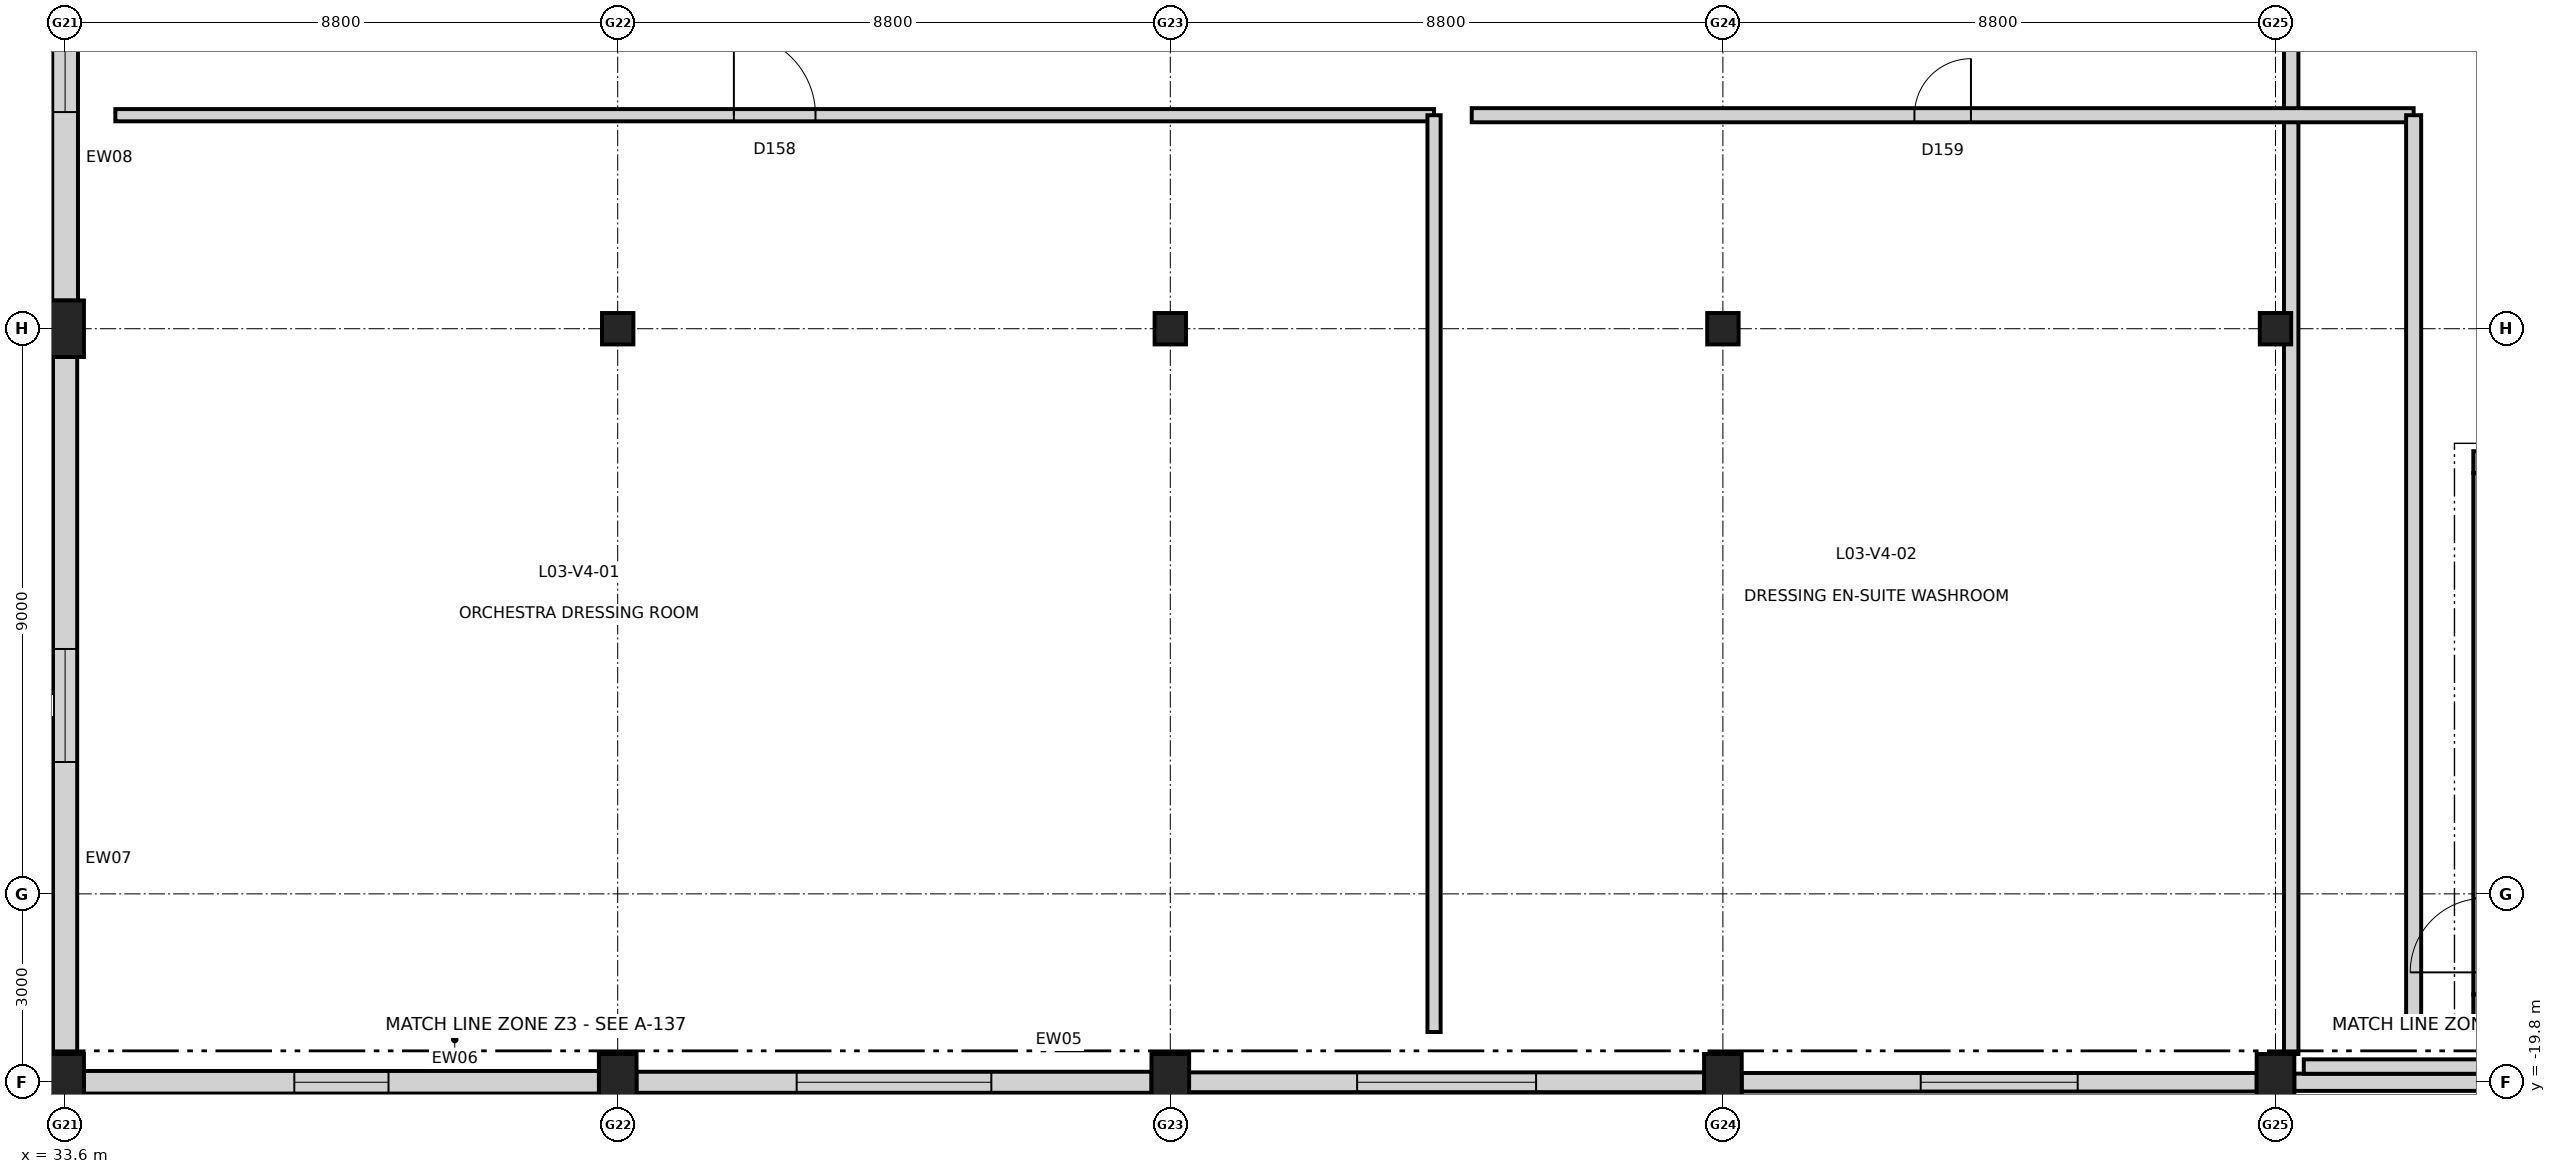
"""IFC4 building model, lengths in metres.
Left out: names, types, materials, properties, quantities, classifications, styles, units other than length and angle.
Written with IfcOpenShell. Run it as: python <this file> out.ifc"""

import sys

from ifc_helpers import new_model, si_unit, direction, frame, frame_2d, origin, origin_2d, place, context, subcontext, project, spatial, rectangle, extrude, element, fill, save


model = new_model("IFC4")
c1 = context("Model", 3, precision=1e-05, world=origin(), true_north=direction((0.0, 1.0)))
c2 = subcontext(c1, "Body", "Model", "MODEL_VIEW")
j1 = project(units=[si_unit("LENGTHUNIT", "METRE"), si_unit("PLANEANGLEUNIT", "RADIAN")], contexts=[c1])
p1 = place(None, origin())
s1 = spatial("IfcSite", under=j1, at=p1, CompositionType="ELEMENT")
p2 = place(p1, origin())
s2 = spatial("IfcBuilding", under=s1, at=p2, CompositionType="ELEMENT")
p3 = place(p2, frame((0.0, 0.0, 15.0)))
s3 = spatial("IfcBuildingStorey", under=s2, at=p3, CompositionType="ELEMENT", Elevation=15.0)
for number, where, z_axis, x_axis in (
    (1, (33.6, -19.8, 0.0), (0.0, 0.0, 1.0), (1.0, 0.0, 0.0)),
    (2, (33.6, -7.8, 0.0), (0.0, 0.0, 1.0), (1.0, 0.0, 0.0)),
    (3, (42.4, -19.8, 0.0), (0.0, 0.0, 1.0), (1.0, 0.0, 0.0)),
):
    element("IfcColumn", number, at=place(p3, frame(where, z_axis=z_axis, x_axis=x_axis)), inside=s3, PredefinedType="COLUMN", context=c2, shape_type="SweptSolid", body=[
        extrude(rectangle(XDim=0.6, YDim=0.9, at=origin_2d()), origin(), (0.0, 0.0, 1.0), 4.8),
    ])
p4 = place(p3, frame((42.4, -7.8, 0.0), z_axis=(0.0, 0.0, 1.0), x_axis=(1.0, 0.0, 0.0)))
e4 = element("IfcColumn", 4, at=p4, inside=s3, PredefinedType="COLUMN", context=c2, shape_type="SweptSolid", body=[
    extrude(rectangle(XDim=0.5, YDim=0.5, at=origin_2d()), origin(), (0.0, 0.0, 1.0), 4.8),
])
p5 = place(p3, frame((51.2, -19.8, 0.0), z_axis=(0.0, 0.0, 1.0), x_axis=(1.0, 0.0, 0.0)))
e5 = element("IfcColumn", 5, at=p5, inside=s3, PredefinedType="COLUMN", context=c2, shape_type="SweptSolid", body=[
    extrude(rectangle(XDim=0.6, YDim=0.9, at=origin_2d()), origin(), (0.0, 0.0, 1.0), 4.8),
])
p6 = place(p3, frame((51.2, -7.8, 0.0), z_axis=(0.0, 0.0, 1.0), x_axis=(1.0, 0.0, 0.0)))
e6 = element("IfcColumn", 6, at=p6, inside=s3, PredefinedType="COLUMN", context=c2, shape_type="SweptSolid", body=[
    extrude(rectangle(XDim=0.5, YDim=0.5, at=origin_2d()), origin(), (0.0, 0.0, 1.0), 4.8),
])
p7 = place(p3, frame((60.0, -19.8, 0.0), z_axis=(0.0, 0.0, 1.0), x_axis=(1.0, 0.0, 0.0)))
e7 = element("IfcColumn", 7, at=p7, inside=s3, PredefinedType="COLUMN", context=c2, shape_type="SweptSolid", body=[
    extrude(rectangle(XDim=0.6, YDim=0.9, at=origin_2d()), origin(), (0.0, 0.0, 1.0), 4.8),
])
p8 = place(p3, frame((60.0, -7.8, 0.0), z_axis=(0.0, 0.0, 1.0), x_axis=(1.0, 0.0, 0.0)))
e8 = element("IfcColumn", 8, at=p8, inside=s3, PredefinedType="COLUMN", context=c2, shape_type="SweptSolid", body=[
    extrude(rectangle(XDim=0.5, YDim=0.5, at=origin_2d()), origin(), (0.0, 0.0, 1.0), 4.8),
])
p9 = place(p3, frame((68.8, -19.8, 0.0), z_axis=(0.0, 0.0, 1.0), x_axis=(1.0, 0.0, 0.0)))
e9 = element("IfcColumn", 9, at=p9, inside=s3, PredefinedType="COLUMN", context=c2, shape_type="SweptSolid", body=[
    extrude(rectangle(XDim=0.6, YDim=0.9, at=origin_2d()), origin(), (0.0, 0.0, 1.0), 4.8),
])
p10 = place(p3, frame((68.8, -7.8, 0.0), z_axis=(0.0, 0.0, 1.0), x_axis=(1.0, 0.0, 0.0)))
e10 = element("IfcColumn", 10, at=p10, inside=s3, PredefinedType="COLUMN", context=c2, shape_type="SweptSolid", body=[
    extrude(rectangle(XDim=0.5, YDim=0.5, at=origin_2d()), origin(), (0.0, 0.0, 1.0), 4.8),
])
p11 = place(p3, frame((77.302, -19.8, 0.0), z_axis=(0.0, 0.0, 1.0), x_axis=(-1.0, 0.0, 0.0)))
e11 = element("IfcWall", 11, at=p11, inside=s3, PredefinedType="STANDARD", context=c2, shape_type="SweptSolid", body=[
    extrude(rectangle(XDim=8.204, YDim=0.275, at=frame_2d((4.102, 0.0))), origin(), (0.0, 0.0, 1.0), 3.745),
])
p12 = place(p11, frame((3.002, 0.0, 0.85)))
e12 = element("IfcOpeningElement", 12, at=p12, cuts=e11, PredefinedType="OPENING", context=c2, shape_type="SweptSolid", body=[
    extrude(rectangle(XDim=2.2, YDim=2.1, at=frame_2d((1.1, 1.05))), frame((0.0, 0.147, 0.0), z_axis=(0.0, -1.0, 0.0), x_axis=(1.0, 0.0, 0.0)), (0.0, 0.0, 1.0), 0.295),
])
p13 = place(p3, frame((68.502, -19.8, 0.0), z_axis=(0.0, 0.0, 1.0), x_axis=(-1.0, 0.0, 0.0)))
e13 = element("IfcWall", 13, at=p13, inside=s3, PredefinedType="STANDARD", context=c2, shape_type="SweptSolid", body=[
    extrude(rectangle(XDim=8.204, YDim=0.295, at=frame_2d((4.102, 0.0))), origin(), (0.0, 0.0, 1.0), 3.66),
])
p14 = place(p13, frame((2.852, 0.0, 0.85)))
e14 = element("IfcOpeningElement", 14, at=p14, cuts=e13, PredefinedType="OPENING", context=c2, shape_type="SweptSolid", body=[
    extrude(rectangle(XDim=2.5, YDim=2.1, at=frame_2d((1.25, 1.05))), frame((0.0, 0.157, 0.0), z_axis=(0.0, -1.0, 0.0), x_axis=(1.0, 0.0, 0.0)), (0.0, 0.0, 1.0), 0.315),
])
p15 = place(p3, frame((59.702, -19.8, 0.0), z_axis=(0.0, 0.0, 1.0), x_axis=(-1.0, 0.0, 0.0)))
e15 = element("IfcWall", 15, at=p15, inside=s3, PredefinedType="STANDARD", context=c2, shape_type="SweptSolid", body=[
    extrude(rectangle(XDim=8.204, YDim=0.315, at=frame_2d((4.102, 0.0))), origin(), (0.0, 0.0, 1.0), 3.66),
])
p16 = place(p15, frame((2.677, 0.0, 0.85)))
e16 = element("IfcOpeningElement", 16, at=p16, cuts=e15, PredefinedType="OPENING", context=c2, shape_type="SweptSolid", body=[
    extrude(rectangle(XDim=2.85, YDim=2.1, at=frame_2d((1.425, 1.05))), frame((0.0, 0.167, 0.0), z_axis=(0.0, -1.0, 0.0), x_axis=(1.0, 0.0, 0.0)), (0.0, 0.0, 1.0), 0.335),
])
p17 = place(p3, frame((50.902, -19.8, 0.0), z_axis=(0.0, 0.0, 1.0), x_axis=(-1.0, 0.0, 0.0)))
e17 = element("IfcWall", 17, at=p17, inside=s3, PredefinedType="STANDARD", context=c2, shape_type="SweptSolid", body=[
    extrude(rectangle(XDim=8.204, YDim=0.335, at=frame_2d((4.102, 0.0))), origin(), (0.0, 0.0, 1.0), 3.66),
])
p18 = place(p17, frame((2.552, 0.0, 0.85)))
e18 = element("IfcOpeningElement", 18, at=p18, cuts=e17, PredefinedType="OPENING", context=c2, shape_type="SweptSolid", body=[
    extrude(rectangle(XDim=3.1, YDim=2.1, at=frame_2d((1.55, 1.05))), frame((0.0, 0.177, 0.0), z_axis=(0.0, -1.0, 0.0), x_axis=(1.0, 0.0, 0.0)), (0.0, 0.0, 1.0), 0.355),
])
p19 = place(p3, frame((42.102, -19.8, 0.0), z_axis=(0.0, 0.0, 1.0), x_axis=(-1.0, 0.0, 0.0)))
e19 = element("IfcWall", 19, at=p19, inside=s3, PredefinedType="STANDARD", context=c2, shape_type="SweptSolid", body=[
    extrude(rectangle(XDim=8.204, YDim=0.36, at=frame_2d((4.102, 0.0))), origin(), (0.0, 0.0, 1.0), 3.66),
])
p20 = place(p19, frame((3.352, 0.0, 0.6)))
e20 = element("IfcOpeningElement", 20, at=p20, cuts=e19, PredefinedType="OPENING", context=c2, shape_type="SweptSolid", body=[
    extrude(rectangle(XDim=1.5, YDim=2.35, at=frame_2d((0.75, 1.175))), frame((0.0, 0.19, 0.0), z_axis=(0.0, -1.0, 0.0), x_axis=(1.0, 0.0, 0.0)), (0.0, 0.0, 1.0), 0.38),
])
p21 = place(p3, frame((33.6, -19.352, 0.0), z_axis=(0.0, 0.0, 1.0), x_axis=(0.0, 1.0, 0.0)))
e21 = element("IfcWall", 21, at=p21, inside=s3, PredefinedType="STANDARD", context=c2, shape_type="SweptSolid", body=[
    extrude(rectangle(XDim=11.104, YDim=0.385, at=frame_2d((5.552, 0.0))), origin(), (0.0, 0.0, 1.0), 3.66),
])
p22 = place(p21, frame((4.652, 0.0, 0.6)))
e22 = element("IfcOpeningElement", 22, at=p22, cuts=e21, PredefinedType="OPENING", context=c2, shape_type="SweptSolid", body=[
    extrude(rectangle(XDim=1.8, YDim=2.35, at=frame_2d((0.9, 1.175))), frame((0.0, 0.202, 0.0), z_axis=(0.0, -1.0, 0.0), x_axis=(1.0, 0.0, 0.0)), (0.0, 0.0, 1.0), 0.405),
])
p23 = place(p3, frame((33.6, -7.352, 0.0), z_axis=(0.0, 0.0, 1.0), x_axis=(0.0, 1.0, 0.0)))
e23 = element("IfcWall", 23, at=p23, inside=s3, PredefinedType="STANDARD", context=c2, shape_type="SweptSolid", body=[
    extrude(rectangle(XDim=8.104, YDim=0.41, at=frame_2d((4.052, 0.0))), origin(), (0.0, 0.0, 1.0), 3.744),
])
p24 = place(p23, frame((3.002, 0.0, 0.6)))
e24 = element("IfcOpeningElement", 24, at=p24, cuts=e23, PredefinedType="OPENING", context=c2, shape_type="SweptSolid", body=[
    extrude(rectangle(XDim=2.1, YDim=2.35, at=frame_2d((1.05, 1.175))), frame((0.0, 0.215, 0.0), z_axis=(0.0, -1.0, 0.0), x_axis=(1.0, 0.0, 0.0)), (0.0, 0.0, 1.0), 0.43),
])
p25 = place(p3, frame((69.25, -19.55, 4.8), z_axis=(0.0, 0.0, 1.0), x_axis=(1.0, 0.0, 0.0)))
e25 = element("IfcWall", 25, at=p25, inside=s3, PredefinedType="PARAPET", context=c2, shape_type="SweptSolid", body=[
    extrude(rectangle(XDim=7.9, YDim=0.23, at=frame_2d((3.95, 0.0))), origin(), (0.0, 0.0, 1.0), 1.15),
])
p26 = place(p3, frame((69.05, 0.75, 4.8), z_axis=(0.0, 0.0, 1.0), x_axis=(0.0, -1.0, 0.0)))
e26 = element("IfcWall", 26, at=p26, inside=s3, PredefinedType="PARAPET", context=c2, shape_type="SweptSolid", body=[
    extrude(rectangle(XDim=20.1, YDim=0.23, at=frame_2d((10.05, 0.0))), origin(), (0.0, 0.0, 1.0), 1.15),
])
p27 = place(p3, frame((76.55, -18.575, 0.0), z_axis=(0.0, 0.0, 1.0), x_axis=(-1.0, 0.0, 0.0)))
e27 = element("IfcWall", 27, at=p27, inside=s3, PredefinedType="SHEAR", context=c2, shape_type="SweptSolid", body=[
    extrude(rectangle(XDim=4.6, YDim=0.35, at=frame_2d((2.3, 0.0))), origin(), (0.0, 0.0, 1.0), 4.8),
])
p28 = place(p3, frame((72.125, -18.4, 0.0), z_axis=(0.0, 0.0, 1.0), x_axis=(0.0, 1.0, 0.0)))
e28 = element("IfcWall", 28, at=p28, inside=s3, PredefinedType="SHEAR", context=c2, shape_type="SweptSolid", body=[
    extrude(rectangle(XDim=8.3, YDim=0.35, at=frame_2d((4.15, 0.0))), origin(), (0.0, 0.0, 1.0), 4.8),
])
p29 = place(p28, frame((0.35, 0.0, 0.0)))
e29 = element("IfcOpeningElement", 29, at=p29, cuts=e28, PredefinedType="OPENING", context=c2, shape_type="SweptSolid", body=[
    extrude(rectangle(XDim=1.18, YDim=2.15, at=frame_2d((0.59, 1.075))), frame((0.0, 0.185, 0.0), z_axis=(0.0, -1.0, 0.0), x_axis=(1.0, 0.0, 0.0)), (0.0, 0.0, 1.0), 0.37),
])
p30 = place(p3, frame((71.95, -9.925, 0.0), z_axis=(0.0, 0.0, 1.0), x_axis=(1.0, 0.0, 0.0)))
e30 = element("IfcWall", 30, at=p30, inside=s3, PredefinedType="SHEAR", context=c2, shape_type="SweptSolid", body=[
    extrude(rectangle(XDim=4.6, YDim=0.35, at=frame_2d((2.3, 0.0))), origin(), (0.0, 0.0, 1.0), 4.8),
])
p31 = place(p3, frame((34.4, -4.4, 0.0), z_axis=(0.0, 0.0, 1.0), x_axis=(1.0, 0.0, 0.0)))
e31 = element("IfcWall", 31, at=p31, inside=s3, PredefinedType="PARTITIONING", context=c2, shape_type="SweptSolid", body=[
    extrude(rectangle(XDim=21.0, YDim=0.195, at=frame_2d((10.5, 0.0))), origin(), (0.0, 0.0, 1.0), 4.42),
])
p32 = place(p31, frame((9.85, 0.0, 0.0)))
e32 = element("IfcOpeningElement", 32, at=p32, cuts=e31, PredefinedType="OPENING", context=c2, shape_type="SweptSolid", body=[
    extrude(rectangle(XDim=1.3, YDim=2.25, at=frame_2d((0.65, 1.125))), frame((0.0, 0.107, 0.0), z_axis=(0.0, -1.0, 0.0), x_axis=(1.0, 0.0, 0.0)), (0.0, 0.0, 1.0), 0.215),
])
p33 = place(p3, frame((55.4, -19.0, 0.0), z_axis=(0.0, 0.0, 1.0), x_axis=(0.0, 1.0, 0.0)))
e33 = element("IfcWall", 33, at=p33, inside=s3, PredefinedType="PARTITIONING", context=c2, shape_type="SweptSolid", body=[
    extrude(rectangle(XDim=14.6, YDim=0.21, at=frame_2d((7.3, 0.0))), origin(), (0.0, 0.0, 1.0), 4.42),
])
p34 = place(p3, frame((56.0, -4.4, 0.0), z_axis=(0.0, 0.0, 1.0), x_axis=(1.0, 0.0, 0.0)))
e34 = element("IfcWall", 34, at=p34, inside=s3, PredefinedType="PARTITIONING", context=c2, shape_type="SweptSolid", body=[
    extrude(rectangle(XDim=15.0, YDim=0.225, at=frame_2d((7.5, 0.0))), origin(), (0.0, 0.0, 1.0), 4.42),
])
p35 = place(p34, frame((7.05, 0.0, 0.0)))
e35 = element("IfcOpeningElement", 35, at=p35, cuts=e34, PredefinedType="OPENING", context=c2, shape_type="SweptSolid", body=[
    extrude(rectangle(XDim=0.9, YDim=2.1, at=frame_2d((0.45, 1.05))), frame((0.0, 0.123, 0.0), z_axis=(0.0, -1.0, 0.0), x_axis=(1.0, 0.0, 0.0)), (0.0, 0.0, 1.0), 0.245),
])
p36 = place(p3, frame((71.0, -19.0, 0.0), z_axis=(0.0, 0.0, 1.0), x_axis=(0.0, 1.0, 0.0)))
e36 = element("IfcWall", 36, at=p36, inside=s3, PredefinedType="PARTITIONING", context=c2, shape_type="SweptSolid", body=[
    extrude(rectangle(XDim=14.6, YDim=0.24, at=frame_2d((7.3, 0.0))), origin(), (0.0, 0.0, 1.0), 4.42),
])
p37 = place(p14, origin())
e37 = element("IfcWindow", 37, at=p37, inside=s3, PartitioningType="SINGLE_PANEL", PredefinedType="WINDOW", context=c2, shape_type="SweptSolid", body=[
    extrude(rectangle(XDim=2.5, YDim=2.1, at=frame_2d((1.25, 1.05))), frame((0.0, 0.03, 0.0), z_axis=(0.0, -1.0, 0.0), x_axis=(1.0, 0.0, 0.0)), (0.0, 0.0, 1.0), 0.06),
])
fill(e14, e37)
p38 = place(p16, origin())
e38 = element("IfcWindow", 38, at=p38, inside=s3, PartitioningType="SINGLE_PANEL", PredefinedType="WINDOW", context=c2, shape_type="SweptSolid", body=[
    extrude(rectangle(XDim=2.85, YDim=2.1, at=frame_2d((1.425, 1.05))), frame((0.0, 0.03, 0.0), z_axis=(0.0, -1.0, 0.0), x_axis=(1.0, 0.0, 0.0)), (0.0, 0.0, 1.0), 0.06),
])
fill(e16, e38)
p39 = place(p18, origin())
e39 = element("IfcWindow", 39, at=p39, inside=s3, PartitioningType="SINGLE_PANEL", PredefinedType="WINDOW", context=c2, shape_type="SweptSolid", body=[
    extrude(rectangle(XDim=3.1, YDim=2.1, at=frame_2d((1.55, 1.05))), frame((0.0, 0.03, 0.0), z_axis=(0.0, -1.0, 0.0), x_axis=(1.0, 0.0, 0.0)), (0.0, 0.0, 1.0), 0.06),
])
fill(e18, e39)
p40 = place(p20, origin())
e40 = element("IfcWindow", 40, at=p40, inside=s3, PartitioningType="SINGLE_PANEL", PredefinedType="WINDOW", context=c2, shape_type="SweptSolid", body=[
    extrude(rectangle(XDim=1.5, YDim=2.35, at=frame_2d((0.75, 1.175))), frame((0.0, 0.03, 0.0), z_axis=(0.0, -1.0, 0.0), x_axis=(1.0, 0.0, 0.0)), (0.0, 0.0, 1.0), 0.06),
])
fill(e20, e40)
p41 = place(p22, origin())
e41 = element("IfcWindow", 41, at=p41, inside=s3, PartitioningType="SINGLE_PANEL", PredefinedType="WINDOW", context=c2, shape_type="SweptSolid", body=[
    extrude(rectangle(XDim=1.8, YDim=2.35, at=frame_2d((0.9, 1.175))), frame((0.0, 0.03, 0.0), z_axis=(0.0, -1.0, 0.0), x_axis=(1.0, 0.0, 0.0)), (0.0, 0.0, 1.0), 0.06),
])
fill(e22, e41)
p42 = place(p24, origin())
e42 = element("IfcWindow", 42, at=p42, inside=s3, PartitioningType="SINGLE_PANEL", PredefinedType="WINDOW", context=c2, shape_type="SweptSolid", body=[
    extrude(rectangle(XDim=2.1, YDim=2.35, at=frame_2d((1.05, 1.175))), frame((0.0, 0.03, 0.0), z_axis=(0.0, -1.0, 0.0), x_axis=(1.0, 0.0, 0.0)), (0.0, 0.0, 1.0), 0.06),
])
fill(e24, e42)
p43 = place(p32, origin())
e43 = element("IfcDoor", 43, at=p43, inside=s3, OperationType="SINGLE_SWING_LEFT", PredefinedType="DOOR", context=c2, shape_type="SweptSolid", body=[
    extrude(rectangle(XDim=1.3, YDim=2.25, at=frame_2d((0.65, 1.125))), frame((0.0, 0.025, 0.0), z_axis=(0.0, -1.0, 0.0), x_axis=(1.0, 0.0, 0.0)), (0.0, 0.0, 1.0), 0.05),
])
fill(e32, e43)
p44 = place(p35, origin())
e44 = element("IfcDoor", 44, at=p44, inside=s3, OperationType="SINGLE_SWING_RIGHT", PredefinedType="DOOR", context=c2, shape_type="SweptSolid", body=[
    extrude(rectangle(XDim=0.9, YDim=2.1, at=frame_2d((0.45, 1.05))), frame((0.0, 0.025, 0.0), z_axis=(0.0, -1.0, 0.0), x_axis=(1.0, 0.0, 0.0)), (0.0, 0.0, 1.0), 0.05),
])
fill(e35, e44)
save(model, sys.argv[1])
